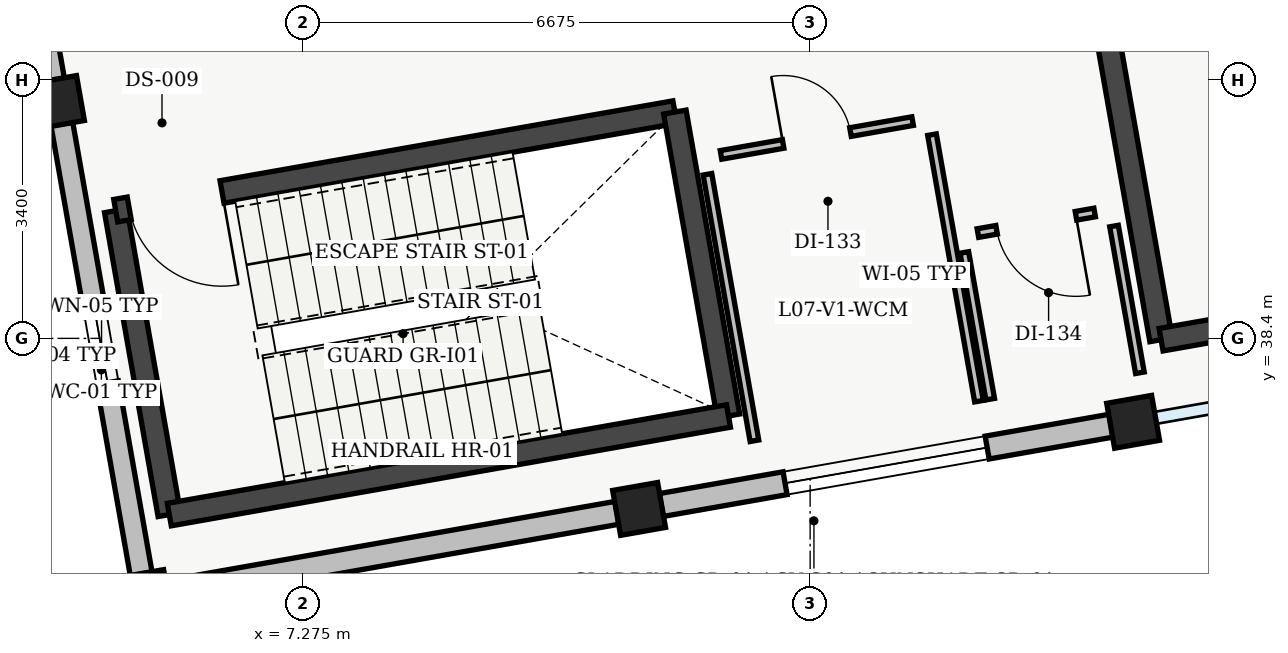
"""IFC4 building model, lengths in metres.
Left out: names, types, materials, properties, quantities, classifications, styles, units other than length and angle.
Written with IfcOpenShell. Run it as: python <this file> out.ifc"""

import sys

from ifc_helpers import new_model, si_unit, direction, frame, frame_2d, origin, origin_2d, place, context, subcontext, project, spatial, rectangle, extrude, element, fill, save


model = new_model("IFC4")
c1 = context("Model", 3, precision=1e-05, world=origin(), true_north=direction((0.0, 1.0)))
c2 = subcontext(c1, "Body", "Model", "MODEL_VIEW")
j1 = project(units=[si_unit("LENGTHUNIT", "METRE"), si_unit("PLANEANGLEUNIT", "RADIAN")], contexts=[c1])
p1 = place(None, origin())
s1 = spatial("IfcSite", under=j1, at=p1, CompositionType="ELEMENT")
p2 = place(p1, origin())
s2 = spatial("IfcBuilding", under=s1, at=p2, CompositionType="ELEMENT")
p3 = place(p2, frame((0.0, 0.0, 32.1)))
s3 = spatial("IfcBuildingStorey", under=s2, at=p3, CompositionType="ELEMENT", Elevation=32.1)
for number, where, z_axis, x_axis in (
    (1, (5.2, 35.01, 0.0), (0.0, 0.0, 1.0), (0.985, 0.174, 0.0)),
    (2, (4.054, 41.51, 0.0), (0.0, 0.0, 1.0), (0.985, 0.174, 0.0)),
    (3, (11.7, 36.156, 0.0), (0.0, 0.0, 1.0), (0.985, 0.174, 0.0)),
    (4, (18.199, 37.302, 0.0), (0.0, 0.0, 1.0), (0.985, 0.174, 0.0)),
):
    element("IfcColumn", number, at=place(p3, frame(where, z_axis=z_axis, x_axis=x_axis)), inside=s3, PredefinedType="COLUMN", context=c2, shape_type="SweptSolid", body=[
        extrude(rectangle(XDim=0.6, YDim=0.6, at=origin_2d()), origin(), (0.0, 0.0, 1.0), 4.31),
    ])
p4 = place(p3, frame((5.149, 35.301, 0.0), z_axis=(0.0, 0.0, 1.0), x_axis=(-0.173620796507, 0.984812580657, 0.0)))
e5 = element("IfcWall", 5, at=p4, inside=s3, PredefinedType="STANDARD", context=c2, shape_type="SweptSolid", body=[
    extrude(rectangle(XDim=6.01, YDim=0.29, at=frame_2d((3.005, 0.0))), origin(), (0.0, 0.0, 1.0), 3.795),
])
p5 = place(p4, frame((2.555, 0.0, 0.95)))
e6 = element("IfcOpeningElement", 6, at=p5, cuts=e5, PredefinedType="OPENING", context=c2, shape_type="SweptSolid", body=[
    extrude(rectangle(XDim=0.9, YDim=1.5, at=frame_2d((0.45, 0.75))), frame((0.0, 0.145, 0.0), z_axis=(0.0, -1.0, 0.0), x_axis=(1.0, 0.0, 0.0)), (0.0, 0.0, 1.0), 0.29),
])
p6 = place(p3, frame((4.003, 41.8, 0.0), z_axis=(0.0, 0.0, 1.0), x_axis=(-0.173660194111, 0.984805634113, 0.0)))
e7 = element("IfcWall", 7, at=p6, inside=s3, PredefinedType="STANDARD", context=c2, shape_type="SweptSolid", body=[
    extrude(rectangle(XDim=6.01, YDim=0.275, at=frame_2d((3.005, 0.0))), origin(), (0.0, 0.0, 1.0), 3.795),
])
p7 = place(p6, frame((1.955, 0.0, 0.95)))
e8 = element("IfcOpeningElement", 8, at=p7, cuts=e7, PredefinedType="OPENING", context=c2, shape_type="SweptSolid", body=[
    extrude(rectangle(XDim=2.1, YDim=1.8, at=frame_2d((1.05, 0.9))), frame((0.0, 0.137, 0.0), z_axis=(0.0, -1.0, 0.0), x_axis=(1.0, 0.0, 0.0)), (0.0, 0.0, 1.0), 0.275),
])
p8 = place(p3, frame((17.909, 37.251, 0.0), z_axis=(0.0, 0.0, 1.0), x_axis=(-0.984805634113, -0.173660194111, 0.0)))
e9 = element("IfcWall", 9, at=p8, inside=s3, PredefinedType="STANDARD", context=c2, shape_type="SweptSolid", body=[
    extrude(rectangle(XDim=6.01, YDim=0.305, at=frame_2d((3.005, 0.0))), origin(), (0.0, 0.0, 1.0), 3.795),
])
p9 = place(p8, frame((1.655, 0.0, 0.95)))
e10 = element("IfcOpeningElement", 10, at=p9, cuts=e9, PredefinedType="OPENING", context=c2, shape_type="SweptSolid", body=[
    extrude(rectangle(XDim=2.7, YDim=1.8, at=frame_2d((1.35, 0.9))), frame((0.0, 0.152, 0.0), z_axis=(0.0, -1.0, 0.0), x_axis=(1.0, 0.0, 0.0)), (0.0, 0.0, 1.0), 0.305),
])
p10 = place(p3, frame((11.409, 36.105, 0.0), z_axis=(0.0, 0.0, 1.0), x_axis=(-0.984812580657, -0.173620796507, 0.0)))
e11 = element("IfcWall", 11, at=p10, inside=s3, PredefinedType="STANDARD", context=c2, shape_type="SweptSolid", body=[
    extrude(rectangle(XDim=6.01, YDim=0.305, at=frame_2d((3.005, 0.0))), origin(), (0.0, 0.0, 1.0), 3.795),
])
p11 = place(p3, frame((5.519, 36.082, 0.0), z_axis=(0.0, 0.0, 1.0), x_axis=(-0.173665267602, 0.984804739443, 0.0)))
e12 = element("IfcWall", 12, at=p11, inside=s3, PredefinedType="SHEAR", context=c2, shape_type="SweptSolid", body=[
    extrude(rectangle(XDim=4.06, YDim=0.3, at=frame_2d((2.03, 0.0))), origin(), (0.0, 0.0, 1.0), 4.28),
])
p12 = place(p3, frame((4.814, 40.08, 0.0), z_axis=(0.0, 0.0, 1.0), x_axis=(0.984802636214, 0.173677193974, 0.0)))
e13 = element("IfcWall", 13, at=p12, inside=s3, PredefinedType="SHEAR", context=c2, shape_type="SweptSolid", body=[
    extrude(rectangle(XDim=7.47, YDim=0.3, at=frame_2d((3.735, 0.0))), origin(), (0.0, 0.0, 1.0), 4.28),
])
p13 = place(p12, frame((0.18, 0.0, 0.0)))
e14 = element("IfcOpeningElement", 14, at=p13, cuts=e13, PredefinedType="OPENING", context=c2, shape_type="SweptSolid", body=[
    extrude(rectangle(XDim=1.24, YDim=2.15, at=frame_2d((0.62, 1.075))), frame((0.0, 0.15, 0.0), z_axis=(0.0, -1.0, 0.0), x_axis=(1.0, 0.0, 0.0)), (0.0, 0.0, 1.0), 0.3),
])
p14 = place(p3, frame((12.17, 41.377, 0.0), z_axis=(0.0, 0.0, 1.0), x_axis=(0.173654983803, -0.984806552883, 0.0)))
e15 = element("IfcWall", 15, at=p14, inside=s3, PredefinedType="SHEAR", context=c2, shape_type="SweptSolid", body=[
    extrude(rectangle(XDim=4.06, YDim=0.3, at=frame_2d((2.03, 0.0))), origin(), (0.0, 0.0, 1.0), 4.28),
])
p15 = place(p3, frame((12.875, 37.379, 0.0), z_axis=(0.0, 0.0, 1.0), x_axis=(-0.984808225754, -0.173645496596, 0.0)))
e16 = element("IfcWall", 16, at=p15, inside=s3, PredefinedType="SHEAR", context=c2, shape_type="SweptSolid", body=[
    extrude(rectangle(XDim=7.47, YDim=0.3, at=frame_2d((3.735, 0.0))), origin(), (0.0, 0.0, 1.0), 4.28),
])
p16 = place(p3, frame((18.567, 38.383, 0.0), z_axis=(0.0, 0.0, 1.0), x_axis=(-0.173606946886, 0.984815022221, 0.0)))
e17 = element("IfcWall", 17, at=p16, inside=s3, PredefinedType="SHEAR", context=c2, shape_type="SweptSolid", body=[
    extrude(rectangle(XDim=4.06, YDim=0.3, at=frame_2d((2.03, 0.0))), origin(), (0.0, 0.0, 1.0), 4.28),
])
p17 = place(p3, frame((25.924, 39.68, 0.0), z_axis=(0.0, 0.0, 1.0), x_axis=(-0.984809211193, -0.173639907711, 0.0)))
e18 = element("IfcWall", 18, at=p17, inside=s3, PredefinedType="SHEAR", context=c2, shape_type="SweptSolid", body=[
    extrude(rectangle(XDim=7.47, YDim=0.3, at=frame_2d((3.735, 0.0))), origin(), (0.0, 0.0, 1.0), 4.28),
])
p18 = place(p3, frame((16.171, 37.574, 0.0), z_axis=(0.0, 0.0, 1.0), x_axis=(-0.173644490041, 0.984808403233, 0.0)))
e19 = element("IfcWall", 19, at=p18, inside=s3, PredefinedType="PARTITIONING", context=c2, shape_type="SweptSolid", body=[
    extrude(rectangle(XDim=3.56, YDim=0.115, at=frame_2d((1.78, 0.0))), origin(), (0.0, 0.0, 1.0), 3.95),
])
p19 = place(p3, frame((15.298, 41.259, 0.0), z_axis=(0.0, 0.0, 1.0), x_axis=(-0.984803714572, -0.17367107924, 0.0)))
e20 = element("IfcWall", 20, at=p19, inside=s3, PredefinedType="PARTITIONING", context=c2, shape_type="SweptSolid", body=[
    extrude(rectangle(XDim=2.56, YDim=0.115, at=frame_2d((1.28, 0.0))), origin(), (0.0, 0.0, 1.0), 3.95),
])
p20 = place(p19, frame((0.83, 0.0, 0.0)))
e21 = element("IfcOpeningElement", 21, at=p20, cuts=e20, PredefinedType="OPENING", context=c2, shape_type="SweptSolid", body=[
    extrude(rectangle(XDim=0.9, YDim=2.1, at=frame_2d((0.45, 1.05))), frame((0.0, 0.058, 0.0), z_axis=(0.0, -1.0, 0.0), x_axis=(1.0, 0.0, 0.0)), (0.0, 0.0, 1.0), 0.115),
])
p21 = place(p3, frame((12.599, 40.559, 0.0), z_axis=(0.0, 0.0, 1.0), x_axis=(0.173644490041, -0.984808403233, 0.0)))
e22 = element("IfcWall", 22, at=p21, inside=s3, PredefinedType="PARTITIONING", context=c2, shape_type="SweptSolid", body=[
    extrude(rectangle(XDim=3.56, YDim=0.115, at=frame_2d((1.78, 0.0))), origin(), (0.0, 0.0, 1.0), 3.95),
])
p22 = place(p3, frame((18.289, 37.948, 0.0), z_axis=(0.0, 0.0, 1.0), x_axis=(-0.173643211285, 0.984808628706, 0.0)))
e23 = element("IfcWall", 23, at=p22, inside=s3, PredefinedType="PARTITIONING", context=c2, shape_type="SweptSolid", body=[
    extrude(rectangle(XDim=1.96, YDim=0.115, at=frame_2d((0.98, 0.0))), origin(), (0.0, 0.0, 1.0), 3.745),
])
p23 = place(p3, frame((17.694, 40.056, 0.0), z_axis=(0.0, 0.0, 1.0), x_axis=(-0.984797734253, -0.173704987291, 0.0)))
e24 = element("IfcWall", 24, at=p23, inside=s3, PredefinedType="PARTITIONING", context=c2, shape_type="SweptSolid", body=[
    extrude(rectangle(XDim=1.56, YDim=0.115, at=frame_2d((0.78, 0.0))), origin(), (0.0, 0.0, 1.0), 3.95),
])
p24 = place(p23, frame((0.25, 0.0, 0.0)))
e25 = element("IfcOpeningElement", 25, at=p24, cuts=e24, PredefinedType="OPENING", context=c2, shape_type="SweptSolid", body=[
    extrude(rectangle(XDim=1.06, YDim=2.12, at=frame_2d((0.53, 1.06))), frame((0.0, 0.058, 0.0), z_axis=(0.0, -1.0, 0.0), x_axis=(1.0, 0.0, 0.0)), (0.0, 0.0, 1.0), 0.115),
])
p25 = place(p3, frame((15.979, 39.53, 0.0), z_axis=(0.0, 0.0, 1.0), x_axis=(0.173643211285, -0.984808628706, 0.0)))
e26 = element("IfcWall", 26, at=p25, inside=s3, PredefinedType="PARTITIONING", context=c2, shape_type="SweptSolid", body=[
    extrude(rectangle(XDim=1.96, YDim=0.115, at=frame_2d((0.98, 0.0))), origin(), (0.0, 0.0, 1.0), 3.95),
])
p26 = place(p5, origin())
e27 = element("IfcWindow", 27, at=p26, inside=s3, PartitioningType="SINGLE_PANEL", PredefinedType="WINDOW", context=c2, shape_type="SweptSolid", body=[
    extrude(rectangle(XDim=0.9, YDim=1.5, at=frame_2d((0.45, 0.75))), frame((0.0, 0.03, 0.0), z_axis=(0.0, -1.0, 0.0), x_axis=(1.0, 0.0, 0.0)), (0.0, 0.0, 1.0), 0.06),
])
fill(e6, e27)
p27 = place(p9, origin())
e28 = element("IfcWindow", 28, at=p27, inside=s3, PartitioningType="SINGLE_PANEL", PredefinedType="WINDOW", context=c2, shape_type="SweptSolid", body=[
    extrude(rectangle(XDim=2.7, YDim=1.8, at=frame_2d((1.35, 0.9))), frame((0.0, 0.03, 0.0), z_axis=(0.0, -1.0, 0.0), x_axis=(1.0, 0.0, 0.0)), (0.0, 0.0, 1.0), 0.06),
])
fill(e10, e28)
p28 = place(p13, origin())
e29 = element("IfcDoor", 29, at=p28, inside=s3, OperationType="SINGLE_SWING_RIGHT", PredefinedType="DOOR", context=c2, shape_type="SweptSolid", body=[
    extrude(rectangle(XDim=1.24, YDim=2.15, at=frame_2d((0.62, 1.075))), frame((0.0, 0.025, 0.0), z_axis=(0.0, -1.0, 0.0), x_axis=(1.0, 0.0, 0.0)), (0.0, 0.0, 1.0), 0.05),
])
fill(e14, e29)
p29 = place(p20, origin())
e30 = element("IfcDoor", 30, at=p29, inside=s3, OperationType="SINGLE_SWING_RIGHT", PredefinedType="DOOR", context=c2, shape_type="SweptSolid", body=[
    extrude(rectangle(XDim=0.9, YDim=2.1, at=frame_2d((0.45, 1.05))), frame((0.0, 0.025, 0.0), z_axis=(0.0, -1.0, 0.0), x_axis=(1.0, 0.0, 0.0)), (0.0, 0.0, 1.0), 0.05),
])
fill(e21, e30)
p30 = place(p24, origin())
e31 = element("IfcDoor", 31, at=p30, inside=s3, OperationType="SINGLE_SWING_LEFT", PredefinedType="DOOR", context=c2, shape_type="SweptSolid", body=[
    extrude(rectangle(XDim=1.06, YDim=2.12, at=frame_2d((0.53, 1.06))), frame((0.0, 0.025, 0.0), z_axis=(0.0, -1.0, 0.0), x_axis=(1.0, 0.0, 0.0)), (0.0, 0.0, 1.0), 0.05),
])
fill(e25, e31)
save(model, sys.argv[1])
